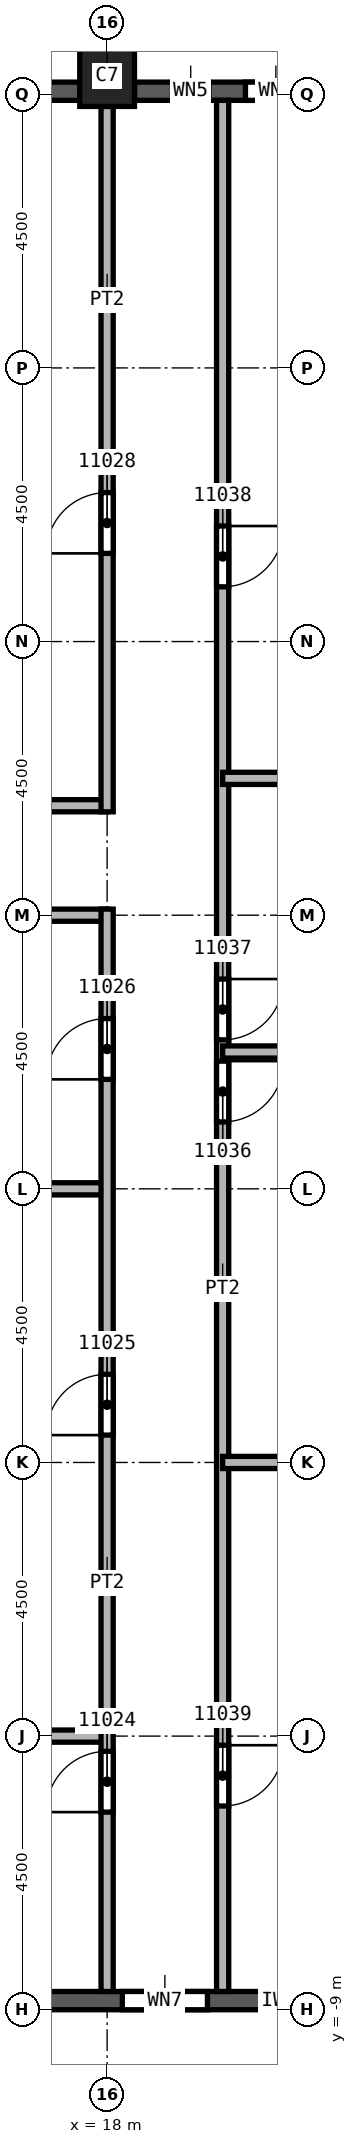
"""IFC4 building model, lengths in metres.
Left out: names, types, materials, properties, quantities, classifications, styles, units other than length and angle.
Written with IfcOpenShell. Run it as: python <this file> out.ifc"""

import sys

from ifc_helpers import new_model, si_unit, direction, frame, frame_2d, origin, origin_2d, place, context, subcontext, project, spatial, rectangle, extrude, element, fill, save


model = new_model("IFC4")
c1 = context("Model", 3, precision=1e-05, world=origin(), true_north=direction((0.0, 1.0)))
c2 = subcontext(c1, "Body", "Model", "MODEL_VIEW")
j1 = project(units=[si_unit("LENGTHUNIT", "METRE"), si_unit("PLANEANGLEUNIT", "RADIAN")], contexts=[c1])
p1 = place(None, origin())
s1 = spatial("IfcSite", under=j1, at=p1, CompositionType="ELEMENT")
p2 = place(p1, origin())
s2 = spatial("IfcBuilding", under=s1, at=p2, CompositionType="ELEMENT")
p3 = place(p2, frame((0.0, 0.0, 184.0)))
s3 = spatial("IfcBuildingStorey", under=s2, at=p3, CompositionType="ELEMENT", Elevation=184.0)
p4 = place(p3, frame((18.0, 22.8, 0.0), z_axis=(0.0, 0.0, 1.0), x_axis=(1.0, 0.0, 0.0)))
e1 = element("IfcColumn", 1, at=p4, inside=s3, PredefinedType="COLUMN", context=c2, shape_type="SweptSolid", body=[
    extrude(rectangle(XDim=0.9, YDim=1.0, at=origin_2d()), origin(), (0.0, 0.0, 1.0), 3.72),
])
p5 = place(p3, frame((22.05, 22.55, 0.0), z_axis=(0.0, 0.0, 1.0), x_axis=(-1.0, 0.0, 0.0)))
e2 = element("IfcWall", 2, at=p5, inside=s3, PredefinedType="SOLIDWALL", context=c2, shape_type="SweptSolid", body=[
    extrude(rectangle(XDim=3.6, YDim=0.3, at=frame_2d((1.8, 0.0))), origin(), (0.0, 0.0, 1.0), 3.12),
])
p6 = place(p5, frame((0.775, 0.0, 0.8)))
e3 = element("IfcOpeningElement", 3, at=p6, cuts=e2, PredefinedType="OPENING", context=c2, shape_type="SweptSolid", body=[
    extrude(rectangle(XDim=1.0, YDim=1.95, at=frame_2d((0.5, 0.975))), frame((0.0, 0.15, 0.0), z_axis=(0.0, -1.0, 0.0), x_axis=(1.0, 0.0, 0.0)), (0.0, 0.0, 1.0), 0.3),
])
p7 = place(p5, frame((2.375, 0.0, 0.8)))
e4 = element("IfcOpeningElement", 4, at=p7, cuts=e2, PredefinedType="OPENING", context=c2, shape_type="SweptSolid", body=[
    extrude(rectangle(XDim=0.6, YDim=1.95, at=frame_2d((0.3, 0.975))), frame((0.0, 0.15, 0.0), z_axis=(0.0, -1.0, 0.0), x_axis=(1.0, 0.0, 0.0)), (0.0, 0.0, 1.0), 0.3),
])
p8 = place(p3, frame((17.55, 22.55, 0.0), z_axis=(0.0, 0.0, 1.0), x_axis=(-1.0, 0.0, 0.0)))
e5 = element("IfcWall", 5, at=p8, inside=s3, PredefinedType="SOLIDWALL", context=c2, shape_type="SweptSolid", body=[
    extrude(rectangle(XDim=3.6, YDim=0.3, at=frame_2d((1.8, 0.0))), origin(), (0.0, 0.0, 1.0), 3.12),
])
p9 = place(p8, frame((0.6, 0.0, 0.8)))
e6 = element("IfcOpeningElement", 6, at=p9, cuts=e5, PredefinedType="OPENING", context=c2, shape_type="SweptSolid", body=[
    extrude(rectangle(XDim=2.4, YDim=1.95, at=frame_2d((1.2, 0.975))), frame((0.0, 0.15, 0.0), z_axis=(0.0, -1.0, 0.0), x_axis=(1.0, 0.0, 0.0)), (0.0, 0.0, 1.0), 0.3),
])
p10 = place(p3, frame((13.525, -8.85, 0.0), z_axis=(0.0, 0.0, 1.0), x_axis=(1.0, 0.0, 0.0)))
e7 = element("IfcWall", 7, at=p10, inside=s3, PredefinedType="SOLIDWALL", context=c2, shape_type="SweptSolid", body=[
    extrude(rectangle(XDim=8.475, YDim=0.3, at=frame_2d((4.238, 0.0))), origin(), (0.0, 0.0, 1.0), 3.12),
])
p11 = place(p10, frame((0.825, 0.0, 0.8)))
e8 = element("IfcOpeningElement", 8, at=p11, cuts=e7, PredefinedType="OPENING", context=c2, shape_type="SweptSolid", body=[
    extrude(rectangle(XDim=1.8, YDim=1.95, at=frame_2d((0.9, 0.975))), frame((0.0, 0.15, 0.0), z_axis=(0.0, -1.0, 0.0), x_axis=(1.0, 0.0, 0.0)), (0.0, 0.0, 1.0), 0.3),
])
p12 = place(p10, frame((4.725, 0.0, 0.8)))
e9 = element("IfcOpeningElement", 9, at=p12, cuts=e7, PredefinedType="OPENING", context=c2, shape_type="SweptSolid", body=[
    extrude(rectangle(XDim=1.4, YDim=1.95, at=frame_2d((0.7, 0.975))), frame((0.0, 0.15, 0.0), z_axis=(0.0, -1.0, 0.0), x_axis=(1.0, 0.0, 0.0)), (0.0, 0.0, 1.0), 0.3),
])
for number, where, z_axis, x_axis in (
    (10, (13.5, -4.5, 0.0), (0.0, 0.0, 1.0), (1.0, 0.0, 0.0)),
    (11, (13.5, 4.5, 0.0), (0.0, 0.0, 1.0), (1.0, 0.0, 0.0)),
    (12, (18.0, 9.0, 0.0), (0.0, 0.0, 1.0), (-1.0, 0.0, 0.0)),
):
    element("IfcWall", number, at=place(p3, frame(where, z_axis=z_axis, x_axis=x_axis)), inside=s3, PredefinedType="PARTITIONING", context=c2, shape_type="SweptSolid", body=[
        extrude(rectangle(XDim=4.5, YDim=0.2, at=frame_2d((2.25, 0.0))), origin(), (0.0, 0.0, 1.0), 3.72),
    ])
p13 = place(p3, frame((14.4, 10.8, 0.0), z_axis=(0.0, 0.0, 1.0), x_axis=(1.0, 0.0, 0.0)))
e13 = element("IfcWall", 13, at=p13, inside=s3, PredefinedType="PARTITIONING", context=c2, shape_type="SweptSolid", body=[
    extrude(rectangle(XDim=3.6, YDim=0.2, at=frame_2d((1.8, 0.0))), origin(), (0.0, 0.0, 1.0), 3.72),
])
p14 = place(p3, frame((18.0, -8.7, 0.0), z_axis=(0.0, 0.0, 1.0), x_axis=(0.0, 1.0, 0.0)))
e14 = element("IfcWall", 14, at=p14, inside=s3, PredefinedType="PARTITIONING", context=c2, shape_type="SweptSolid", body=[
    extrude(rectangle(XDim=17.8, YDim=0.2, at=frame_2d((8.9, 0.0))), origin(), (0.0, 0.0, 1.0), 3.72),
])
p15 = place(p14, frame((2.95, 0.0, 0.0)))
e15 = element("IfcOpeningElement", 15, at=p15, cuts=e14, PredefinedType="OPENING", context=c2, shape_type="SweptSolid", body=[
    extrude(rectangle(XDim=1.0, YDim=2.1, at=frame_2d((0.5, 1.05))), frame((0.0, 0.1, 0.0), z_axis=(0.0, -1.0, 0.0), x_axis=(1.0, 0.0, 0.0)), (0.0, 0.0, 1.0), 0.2),
])
p16 = place(p14, frame((9.15, 0.0, 0.0)))
e16 = element("IfcOpeningElement", 16, at=p16, cuts=e14, PredefinedType="OPENING", context=c2, shape_type="SweptSolid", body=[
    extrude(rectangle(XDim=1.0, YDim=2.1, at=frame_2d((0.5, 1.05))), frame((0.0, 0.1, 0.0), z_axis=(0.0, -1.0, 0.0), x_axis=(1.0, 0.0, 0.0)), (0.0, 0.0, 1.0), 0.2),
])
p17 = place(p14, frame((15.0, 0.0, 0.0)))
e17 = element("IfcOpeningElement", 17, at=p17, cuts=e14, PredefinedType="OPENING", context=c2, shape_type="SweptSolid", body=[
    extrude(rectangle(XDim=1.0, YDim=2.1, at=frame_2d((0.5, 1.05))), frame((0.0, 0.1, 0.0), z_axis=(0.0, -1.0, 0.0), x_axis=(1.0, 0.0, 0.0)), (0.0, 0.0, 1.0), 0.2),
])
p18 = place(p3, frame((18.0, 10.7, 0.0), z_axis=(0.0, 0.0, 1.0), x_axis=(0.0, 1.0, 0.0)))
e18 = element("IfcWall", 18, at=p18, inside=s3, PredefinedType="PARTITIONING", context=c2, shape_type="SweptSolid", body=[
    extrude(rectangle(XDim=11.6, YDim=0.2, at=frame_2d((5.8, 0.0))), origin(), (0.0, 0.0, 1.0), 3.72),
])
p19 = place(p18, frame((4.25, 0.0, 0.0)))
e19 = element("IfcOpeningElement", 19, at=p19, cuts=e18, PredefinedType="OPENING", context=c2, shape_type="SweptSolid", body=[
    extrude(rectangle(XDim=1.0, YDim=2.1, at=frame_2d((0.5, 1.05))), frame((0.0, 0.1, 0.0), z_axis=(0.0, -1.0, 0.0), x_axis=(1.0, 0.0, 0.0)), (0.0, 0.0, 1.0), 0.2),
])
p20 = place(p3, frame((19.9, 22.4, 0.0), z_axis=(0.0, 0.0, 1.0), x_axis=(0.0, -1.0, 0.0)))
e20 = element("IfcWall", 20, at=p20, inside=s3, PredefinedType="PARTITIONING", context=c2, shape_type="SweptSolid", body=[
    extrude(rectangle(XDim=31.1, YDim=0.2, at=frame_2d((15.55, 0.0))), origin(), (0.0, 0.0, 1.0), 3.72),
])
p21 = place(p20, frame((15.8, 0.0, 0.0)))
e21 = element("IfcOpeningElement", 21, at=p21, cuts=e20, PredefinedType="OPENING", context=c2, shape_type="SweptSolid", body=[
    extrude(rectangle(XDim=1.0, YDim=2.1, at=frame_2d((0.5, 1.05))), frame((0.0, 0.1, 0.0), z_axis=(0.0, -1.0, 0.0), x_axis=(1.0, 0.0, 0.0)), (0.0, 0.0, 1.0), 0.2),
])
p22 = place(p20, frame((14.45, 0.0, 0.0)))
e22 = element("IfcOpeningElement", 22, at=p22, cuts=e20, PredefinedType="OPENING", context=c2, shape_type="SweptSolid", body=[
    extrude(rectangle(XDim=1.0, YDim=2.1, at=frame_2d((0.5, 1.05))), frame((0.0, 0.1, 0.0), z_axis=(0.0, -1.0, 0.0), x_axis=(1.0, 0.0, 0.0)), (0.0, 0.0, 1.0), 0.2),
])
p23 = place(p20, frame((7.0, 0.0, 0.0)))
e23 = element("IfcOpeningElement", 23, at=p23, cuts=e20, PredefinedType="OPENING", context=c2, shape_type="SweptSolid", body=[
    extrude(rectangle(XDim=1.0, YDim=2.1, at=frame_2d((0.5, 1.05))), frame((0.0, 0.1, 0.0), z_axis=(0.0, -1.0, 0.0), x_axis=(1.0, 0.0, 0.0)), (0.0, 0.0, 1.0), 0.2),
])
p24 = place(p20, frame((27.05, 0.0, 0.0)))
e24 = element("IfcOpeningElement", 24, at=p24, cuts=e20, PredefinedType="OPENING", context=c2, shape_type="SweptSolid", body=[
    extrude(rectangle(XDim=1.0, YDim=2.1, at=frame_2d((0.5, 1.05))), frame((0.0, 0.1, 0.0), z_axis=(0.0, -1.0, 0.0), x_axis=(1.0, 0.0, 0.0)), (0.0, 0.0, 1.0), 0.2),
])
for number, where, z_axis, x_axis in (
    (25, (19.9, 6.75, 0.0), (0.0, 0.0, 1.0), (1.0, 0.0, 0.0)),
    (26, (19.9, 11.25, 0.0), (0.0, 0.0, 1.0), (1.0, 0.0, 0.0)),
):
    element("IfcWall", number, at=place(p3, frame(where, z_axis=z_axis, x_axis=x_axis)), inside=s3, PredefinedType="PARTITIONING", context=c2, shape_type="SweptSolid", body=[
        extrude(rectangle(XDim=6.7, YDim=0.2, at=frame_2d((3.35, 0.0))), origin(), (0.0, 0.0, 1.0), 3.72),
    ])
p25 = place(p3, frame((26.5, 0.0, 0.0), z_axis=(0.0, 0.0, 1.0), x_axis=(-1.0, 0.0, 0.0)))
e27 = element("IfcWall", 27, at=p25, inside=s3, PredefinedType="PARTITIONING", context=c2, shape_type="SweptSolid", body=[
    extrude(rectangle(XDim=6.6, YDim=0.2, at=frame_2d((3.3, 0.0))), origin(), (0.0, 0.0, 1.0), 3.72),
])
p26 = place(p15, origin())
e28 = element("IfcDoor", 28, at=p26, inside=s3, OperationType="SINGLE_SWING_LEFT", PredefinedType="DOOR", context=c2, shape_type="SweptSolid", body=[
    extrude(rectangle(XDim=1.0, YDim=2.1, at=frame_2d((0.5, 1.05))), frame((0.0, 0.025, 0.0), z_axis=(0.0, -1.0, 0.0), x_axis=(1.0, 0.0, 0.0)), (0.0, 0.0, 1.0), 0.05),
])
fill(e15, e28)
p27 = place(p16, origin())
e29 = element("IfcDoor", 29, at=p27, inside=s3, OperationType="SINGLE_SWING_RIGHT", PredefinedType="DOOR", context=c2, shape_type="SweptSolid", body=[
    extrude(rectangle(XDim=1.0, YDim=2.1, at=frame_2d((0.5, 1.05))), frame((0.0, 0.025, 0.0), z_axis=(0.0, -1.0, 0.0), x_axis=(1.0, 0.0, 0.0)), (0.0, 0.0, 1.0), 0.05),
])
fill(e16, e29)
p28 = place(p17, origin())
e30 = element("IfcDoor", 30, at=p28, inside=s3, OperationType="SINGLE_SWING_LEFT", PredefinedType="DOOR", context=c2, shape_type="SweptSolid", body=[
    extrude(rectangle(XDim=1.0, YDim=2.1, at=frame_2d((0.5, 1.05))), frame((0.0, 0.025, 0.0), z_axis=(0.0, -1.0, 0.0), x_axis=(1.0, 0.0, 0.0)), (0.0, 0.0, 1.0), 0.05),
])
fill(e17, e30)
p29 = place(p19, origin())
e31 = element("IfcDoor", 31, at=p29, inside=s3, OperationType="SINGLE_SWING_LEFT", PredefinedType="DOOR", context=c2, shape_type="SweptSolid", body=[
    extrude(rectangle(XDim=1.0, YDim=2.1, at=frame_2d((0.5, 1.05))), frame((0.0, 0.025, 0.0), z_axis=(0.0, -1.0, 0.0), x_axis=(1.0, 0.0, 0.0)), (0.0, 0.0, 1.0), 0.05),
])
fill(e19, e31)
p30 = place(p21, origin())
e32 = element("IfcDoor", 32, at=p30, inside=s3, OperationType="SINGLE_SWING_LEFT", PredefinedType="DOOR", context=c2, shape_type="SweptSolid", body=[
    extrude(rectangle(XDim=1.0, YDim=2.1, at=frame_2d((0.5, 1.05))), frame((0.0, 0.025, 0.0), z_axis=(0.0, -1.0, 0.0), x_axis=(1.0, 0.0, 0.0)), (0.0, 0.0, 1.0), 0.05),
])
fill(e21, e32)
p31 = place(p22, origin())
e33 = element("IfcDoor", 33, at=p31, inside=s3, OperationType="SINGLE_SWING_RIGHT", PredefinedType="DOOR", context=c2, shape_type="SweptSolid", body=[
    extrude(rectangle(XDim=1.0, YDim=2.1, at=frame_2d((0.5, 1.05))), frame((0.0, 0.025, 0.0), z_axis=(0.0, -1.0, 0.0), x_axis=(1.0, 0.0, 0.0)), (0.0, 0.0, 1.0), 0.05),
])
fill(e22, e33)
p32 = place(p23, origin())
e34 = element("IfcDoor", 34, at=p32, inside=s3, OperationType="SINGLE_SWING_LEFT", PredefinedType="DOOR", context=c2, shape_type="SweptSolid", body=[
    extrude(rectangle(XDim=1.0, YDim=2.1, at=frame_2d((0.5, 1.05))), frame((0.0, 0.025, 0.0), z_axis=(0.0, -1.0, 0.0), x_axis=(1.0, 0.0, 0.0)), (0.0, 0.0, 1.0), 0.05),
])
fill(e23, e34)
p33 = place(p24, origin())
e35 = element("IfcDoor", 35, at=p33, inside=s3, OperationType="SINGLE_SWING_RIGHT", PredefinedType="DOOR", context=c2, shape_type="SweptSolid", body=[
    extrude(rectangle(XDim=1.0, YDim=2.1, at=frame_2d((0.5, 1.05))), frame((0.0, 0.025, 0.0), z_axis=(0.0, -1.0, 0.0), x_axis=(1.0, 0.0, 0.0)), (0.0, 0.0, 1.0), 0.05),
])
fill(e24, e35)
p34 = place(p6, origin())
e36 = element("IfcWindow", 36, at=p34, inside=s3, PartitioningType="SINGLE_PANEL", PredefinedType="WINDOW", context=c2, shape_type="SweptSolid", body=[
    extrude(rectangle(XDim=1.0, YDim=1.95, at=frame_2d((0.5, 0.975))), frame((0.0, 0.03, 0.0), z_axis=(0.0, -1.0, 0.0), x_axis=(1.0, 0.0, 0.0)), (0.0, 0.0, 1.0), 0.06),
])
fill(e3, e36)
p35 = place(p7, origin())
e37 = element("IfcWindow", 37, at=p35, inside=s3, PartitioningType="SINGLE_PANEL", PredefinedType="WINDOW", context=c2, shape_type="SweptSolid", body=[
    extrude(rectangle(XDim=0.6, YDim=1.95, at=frame_2d((0.3, 0.975))), frame((0.0, 0.03, 0.0), z_axis=(0.0, -1.0, 0.0), x_axis=(1.0, 0.0, 0.0)), (0.0, 0.0, 1.0), 0.06),
])
fill(e4, e37)
p36 = place(p12, origin())
e38 = element("IfcWindow", 38, at=p36, inside=s3, PartitioningType="SINGLE_PANEL", PredefinedType="WINDOW", context=c2, shape_type="SweptSolid", body=[
    extrude(rectangle(XDim=1.4, YDim=1.95, at=frame_2d((0.7, 0.975))), frame((0.0, 0.03, 0.0), z_axis=(0.0, -1.0, 0.0), x_axis=(1.0, 0.0, 0.0)), (0.0, 0.0, 1.0), 0.06),
])
fill(e9, e38)
save(model, sys.argv[1])
